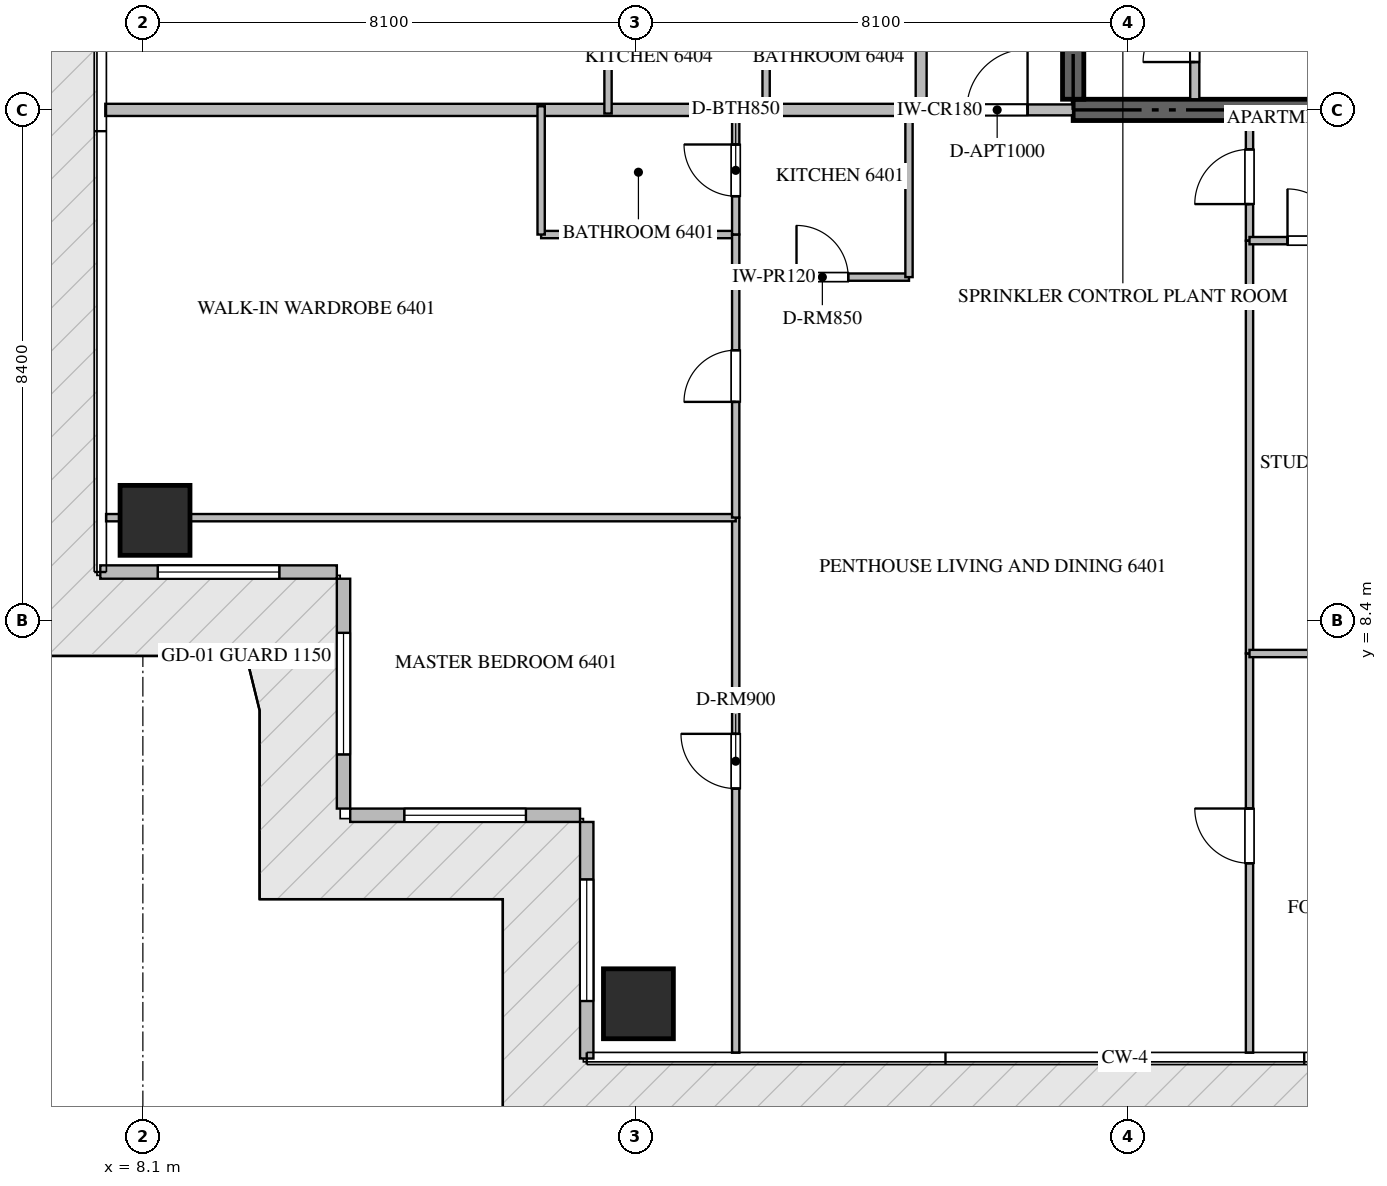
"""IFC4 building model, lengths in metres.
Left out: names, types, materials, properties, quantities, classifications, styles, units other than length and angle.
Written with IfcOpenShell. Run it as: python <this file> out.ifc"""

import sys

from ifc_helpers import new_model, si_unit, direction, frame, frame_2d, origin, origin_2d, place, context, subcontext, project, spatial, rectangle, extrude, source, transform, mapped, element, fill, save


model = new_model("IFC4")
c1 = context("Model", 3, precision=1e-05, world=origin(), true_north=direction((0.0, 1.0)))
c2 = subcontext(c1, "Body", "Model", "MODEL_VIEW")
j1 = project(units=[si_unit("LENGTHUNIT", "METRE"), si_unit("PLANEANGLEUNIT", "RADIAN")], contexts=[c1])
p1 = place(None, origin())
s1 = spatial("IfcSite", under=j1, at=p1, CompositionType="ELEMENT")
p2 = place(p1, origin())
s2 = spatial("IfcBuilding", under=s1, at=p2, CompositionType="ELEMENT")
p3 = place(p2, frame((0.0, 0.0, 256.65)))
s3 = spatial("IfcBuildingStorey", under=s2, at=p3, CompositionType="ELEMENT", Elevation=256.65)
p4 = place(p3, frame((23.4, 16.8, -0.26), z_axis=(0.0, 0.0, 1.0), x_axis=(1.0, 0.0, 0.0)))
e1 = element("IfcWall", 1, at=p4, inside=s3, PredefinedType="SHEAR", context=c2, shape_type="SweptSolid", body=[
    extrude(rectangle(XDim=18.0, YDim=0.35, at=frame_2d((9.0, 0.0))), origin(), (0.0, 0.0, 1.0), 3.848),
])
p5 = place(p3, frame((23.4, 16.975, -0.26), z_axis=(0.0, 0.0, 1.0), x_axis=(0.0, 1.0, 0.0)))
e2 = element("IfcWall", 2, at=p5, inside=s3, PredefinedType="SHEAR", context=c2, shape_type="SweptSolid", body=[
    extrude(rectangle(XDim=4.875, YDim=0.35, at=frame_2d((2.438, 0.0))), origin(), (0.0, 0.0, 1.0), 3.848),
])
m1 = source(origin(), c2, "Body", "SweptSolid", [
    extrude(rectangle(XDim=1.15, YDim=1.15, at=origin_2d()), origin(), (0.0, 0.0, 1.0), 3.85),
])
for number, where, z_axis, x_axis in (
    (3, (16.25, 2.1, -0.26), (0.0, 0.0, 1.0), (1.0, 0.0, 0.0)),
    (4, (8.3, 10.05, -0.26), (0.0, 0.0, 1.0), (1.0, 0.0, 0.0)),
):
    element("IfcColumn", number, at=place(p3, frame(where, z_axis=z_axis, x_axis=x_axis)), inside=s3, PredefinedType="COLUMN", context=c2, shape_type="MappedRepresentation", body=[
        mapped(m1, transform((0.0, 0.0, 0.0), scale=1.0)),
    ])
p6 = place(p3, frame((7.4, 9.2, 0.0), z_axis=(0.0, 0.0, 1.0), x_axis=(1.0, 0.0, 0.0)))
e5 = element("IfcWall", 5, at=p6, inside=s3, PredefinedType="ELEMENTEDWALL", context=c2, shape_type="SweptSolid", body=[
    extrude(rectangle(XDim=3.89, YDim=0.22, at=frame_2d((1.945, 0.0))), origin(), (0.0, 0.0, 1.0), 3.575),
])
p7 = place(p6, frame((0.945, 0.0, 0.65)))
e6 = element("IfcOpeningElement", 6, at=p7, cuts=e5, PredefinedType="OPENING", context=c2, shape_type="SweptSolid", body=[
    extrude(rectangle(XDim=2.0, YDim=2.2, at=frame_2d((1.0, 1.1))), frame((0.0, 0.12, 0.0), z_axis=(0.0, -1.0, 0.0), x_axis=(1.0, 0.0, 0.0)), (0.0, 0.0, 1.0), 0.24),
])
p8 = place(p3, frame((11.4, 9.09, 0.0), z_axis=(0.0, 0.0, 1.0), x_axis=(0.0, -1.0, 0.0)))
e7 = element("IfcWall", 7, at=p8, inside=s3, PredefinedType="ELEMENTEDWALL", context=c2, shape_type="SweptSolid", body=[
    extrude(rectangle(XDim=3.78, YDim=0.22, at=frame_2d((1.89, 0.0))), origin(), (0.0, 0.0, 1.0), 3.575),
])
p9 = place(p8, frame((0.89, 0.0, 0.65)))
e8 = element("IfcOpeningElement", 8, at=p9, cuts=e7, PredefinedType="OPENING", context=c2, shape_type="SweptSolid", body=[
    extrude(rectangle(XDim=2.0, YDim=2.2, at=frame_2d((1.0, 1.1))), frame((0.0, 0.12, 0.0), z_axis=(0.0, -1.0, 0.0), x_axis=(1.0, 0.0, 0.0)), (0.0, 0.0, 1.0), 0.24),
])
p10 = place(p3, frame((11.51, 5.2, 0.0), z_axis=(0.0, 0.0, 1.0), x_axis=(1.0, 0.0, 0.0)))
e9 = element("IfcWall", 9, at=p10, inside=s3, PredefinedType="ELEMENTEDWALL", context=c2, shape_type="SweptSolid", body=[
    extrude(rectangle(XDim=3.78, YDim=0.22, at=frame_2d((1.89, 0.0))), origin(), (0.0, 0.0, 1.0), 3.575),
])
p11 = place(p10, frame((0.89, 0.0, 0.65)))
e10 = element("IfcOpeningElement", 10, at=p11, cuts=e9, PredefinedType="OPENING", context=c2, shape_type="SweptSolid", body=[
    extrude(rectangle(XDim=2.0, YDim=2.2, at=frame_2d((1.0, 1.1))), frame((0.0, 0.12, 0.0), z_axis=(0.0, -1.0, 0.0), x_axis=(1.0, 0.0, 0.0)), (0.0, 0.0, 1.0), 0.24),
])
p12 = place(p3, frame((15.4, 5.09, 0.0), z_axis=(0.0, 0.0, 1.0), x_axis=(0.0, -1.0, 0.0)))
e11 = element("IfcWall", 11, at=p12, inside=s3, PredefinedType="ELEMENTEDWALL", context=c2, shape_type="SweptSolid", body=[
    extrude(rectangle(XDim=3.89, YDim=0.22, at=frame_2d((1.945, 0.0))), origin(), (0.0, 0.0, 1.0), 3.575),
])
p13 = place(p12, frame((0.945, 0.0, 0.65)))
e12 = element("IfcOpeningElement", 12, at=p13, cuts=e11, PredefinedType="OPENING", context=c2, shape_type="SweptSolid", body=[
    extrude(rectangle(XDim=2.0, YDim=2.2, at=frame_2d((1.0, 1.1))), frame((0.0, 0.12, 0.0), z_axis=(0.0, -1.0, 0.0), x_axis=(1.0, 0.0, 0.0)), (0.0, 0.0, 1.0), 0.24),
])
p14 = place(p3, frame((25.4, 16.975, 0.0), z_axis=(0.0, 0.0, 1.0), x_axis=(0.0, 1.0, 0.0)))
e13 = element("IfcWall", 13, at=p14, inside=s3, PredefinedType="PARTITIONING", context=c2, shape_type="SweptSolid", body=[
    extrude(rectangle(XDim=2.075, YDim=0.15, at=frame_2d((1.038, 0.0))), origin(), (0.0, 0.0, 1.0), 3.59),
])
p15 = place(p14, frame((0.612, 0.0, 0.0)))
e14 = element("IfcOpeningElement", 14, at=p15, cuts=e13, PredefinedType="OPENING", context=c2, shape_type="SweptSolid", body=[
    extrude(rectangle(XDim=0.85, YDim=2.1, at=frame_2d((0.425, 1.05))), frame((0.0, 0.085, 0.0), z_axis=(0.0, -1.0, 0.0), x_axis=(1.0, 0.0, 0.0)), (0.0, 0.0, 1.0), 0.17),
])
p16 = place(p3, frame((7.482, 16.8, 0.0), z_axis=(0.0, 0.0, 1.0), x_axis=(1.0, 0.0, 0.0)))
e15 = element("IfcWall", 15, at=p16, inside=s3, PredefinedType="PARTITIONING", context=c2, shape_type="SweptSolid", body=[
    extrude(rectangle(XDim=13.418, YDim=0.2, at=frame_2d((6.709, 0.0))), origin(), (0.0, 0.0, 1.0), 3.59),
])
p17 = place(p3, frame((20.902, 16.8, 0.0), z_axis=(0.0, 0.0, 1.0), x_axis=(1.0, 0.0, 0.0)))
e16 = element("IfcWall", 16, at=p17, inside=s3, PredefinedType="PARTITIONING", context=c2, shape_type="SweptSolid", body=[
    extrude(rectangle(XDim=2.496, YDim=0.18, at=frame_2d((1.248, 0.0))), origin(), (0.0, 0.0, 1.0), 3.59),
])
p18 = place(p17, frame((0.748, 0.0, 0.0)))
e17 = element("IfcOpeningElement", 17, at=p18, cuts=e16, PredefinedType="OPENING", context=c2, shape_type="SweptSolid", body=[
    extrude(rectangle(XDim=1.0, YDim=2.15, at=frame_2d((0.5, 1.075))), frame((0.0, 0.1, 0.0), z_axis=(0.0, -1.0, 0.0), x_axis=(1.0, 0.0, 0.0)), (0.0, 0.0, 1.0), 0.2),
])
p19 = place(p3, frame((20.9, 16.8, 0.0), z_axis=(0.0, 0.0, 1.0), x_axis=(0.0, 1.0, 0.0)))
e18 = element("IfcWall", 18, at=p19, inside=s3, PredefinedType="PARTITIONING", context=c2, shape_type="SweptSolid", body=[
    extrude(rectangle(XDim=16.8, YDim=0.18, at=frame_2d((8.4, 0.0))), origin(), (0.0, 0.0, 1.0), 3.59),
])
p20 = place(p19, frame((3.018, 0.0, 0.0)))
e19 = element("IfcOpeningElement", 19, at=p20, cuts=e18, PredefinedType="OPENING", context=c2, shape_type="SweptSolid", body=[
    extrude(rectangle(XDim=1.0, YDim=2.15, at=frame_2d((0.5, 1.075))), frame((0.0, 0.1, 0.0), z_axis=(0.0, -1.0, 0.0), x_axis=(1.0, 0.0, 0.0)), (0.0, 0.0, 1.0), 0.2),
])
p21 = place(p19, frame((9.18, 0.0, 0.0)))
e20 = element("IfcOpeningElement", 20, at=p21, cuts=e18, PredefinedType="OPENING", context=c2, shape_type="SweptSolid", body=[
    extrude(rectangle(XDim=1.0, YDim=2.15, at=frame_2d((0.5, 1.075))), frame((0.0, 0.1, 0.0), z_axis=(0.0, -1.0, 0.0), x_axis=(1.0, 0.0, 0.0)), (0.0, 0.0, 1.0), 0.2),
])
p22 = place(p19, frame((14.5, 0.0, 0.0)))
e21 = element("IfcOpeningElement", 21, at=p22, cuts=e18, PredefinedType="OPENING", context=c2, shape_type="SweptSolid", body=[
    extrude(rectangle(XDim=1.0, YDim=2.15, at=frame_2d((0.5, 1.075))), frame((0.0, 0.1, 0.0), z_axis=(0.0, -1.0, 0.0), x_axis=(1.0, 0.0, 0.0)), (0.0, 0.0, 1.0), 0.2),
])
p23 = place(p3, frame((17.85, 14.05, 0.0), z_axis=(0.0, 0.0, 1.0), x_axis=(1.0, 0.0, 0.0)))
e22 = element("IfcWall", 22, at=p23, inside=s3, PredefinedType="PARTITIONING", context=c2, shape_type="SweptSolid", body=[
    extrude(rectangle(XDim=2.85, YDim=0.12, at=frame_2d((1.425, 0.0))), origin(), (0.0, 0.0, 1.0), 3.59),
])
p24 = place(p23, frame((1.0, 0.0, 0.0)))
e23 = element("IfcOpeningElement", 23, at=p24, cuts=e22, PredefinedType="OPENING", context=c2, shape_type="SweptSolid", body=[
    extrude(rectangle(XDim=0.85, YDim=2.1, at=frame_2d((0.425, 1.05))), frame((0.0, 0.07, 0.0), z_axis=(0.0, -1.0, 0.0), x_axis=(1.0, 0.0, 0.0)), (0.0, 0.0, 1.0), 0.14),
])
p25 = place(p3, frame((20.7, 14.05, 0.0), z_axis=(0.0, 0.0, 1.0), x_axis=(0.0, 1.0, 0.0)))
e24 = element("IfcWall", 24, at=p25, inside=s3, PredefinedType="PARTITIONING", context=c2, shape_type="SweptSolid", body=[
    extrude(rectangle(XDim=2.81, YDim=0.12, at=frame_2d((1.405, 0.0))), origin(), (0.0, 0.0, 1.0), 3.59),
])
p26 = place(p3, frame((17.85, 1.295, 0.0), z_axis=(0.0, 0.0, 1.0), x_axis=(0.0, 1.0, 0.0)))
e25 = element("IfcWall", 25, at=p26, inside=s3, PredefinedType="PARTITIONING", context=c2, shape_type="SweptSolid", body=[
    extrude(rectangle(XDim=8.799, YDim=0.12, at=frame_2d((4.399, 0.0))), origin(), (0.0, 0.0, 1.0), 3.59),
])
p27 = place(p26, frame((4.344, 0.0, 0.0)))
e26 = element("IfcOpeningElement", 26, at=p27, cuts=e25, PredefinedType="OPENING", context=c2, shape_type="SweptSolid", body=[
    extrude(rectangle(XDim=0.9, YDim=2.1, at=frame_2d((0.45, 1.05))), frame((0.0, 0.07, 0.0), z_axis=(0.0, -1.0, 0.0), x_axis=(1.0, 0.0, 0.0)), (0.0, 0.0, 1.0), 0.14),
])
p28 = place(p3, frame((7.495, 10.094, 0.0), z_axis=(0.0, 0.0, 1.0), x_axis=(1.0, 0.0, 0.0)))
e27 = element("IfcWall", 27, at=p28, inside=s3, PredefinedType="PARTITIONING", context=c2, shape_type="SweptSolid", body=[
    extrude(rectangle(XDim=10.355, YDim=0.12, at=frame_2d((5.177, 0.0))), origin(), (0.0, 0.0, 1.0), 3.122),
])
p29 = place(p3, frame((14.65, 14.75, 0.0), z_axis=(0.0, 0.0, 1.0), x_axis=(1.0, 0.0, 0.0)))
e28 = element("IfcWall", 28, at=p29, inside=s3, PredefinedType="PARTITIONING", context=c2, shape_type="SweptSolid", body=[
    extrude(rectangle(XDim=3.2, YDim=0.12, at=frame_2d((1.6, 0.0))), origin(), (0.0, 0.0, 1.0), 3.59),
])
p30 = place(p3, frame((14.65, 14.75, 0.0), z_axis=(0.0, 0.0, 1.0), x_axis=(0.0, 1.0, 0.0)))
e29 = element("IfcWall", 29, at=p30, inside=s3, PredefinedType="PARTITIONING", context=c2, shape_type="SweptSolid", body=[
    extrude(rectangle(XDim=2.11, YDim=0.12, at=frame_2d((1.055, 0.0))), origin(), (0.0, 0.0, 1.0), 3.59),
])
p31 = place(p3, frame((17.85, 10.096, 0.0), z_axis=(0.0, 0.0, 1.0), x_axis=(0.0, 1.0, 0.0)))
e30 = element("IfcWall", 30, at=p31, inside=s3, PredefinedType="PARTITIONING", context=c2, shape_type="SweptSolid", body=[
    extrude(rectangle(XDim=4.654, YDim=0.12, at=frame_2d((2.327, 0.0))), origin(), (0.0, 0.0, 1.0), 3.59),
])
p32 = place(p31, frame((1.902, 0.0, 0.0)))
e31 = element("IfcOpeningElement", 31, at=p32, cuts=e30, PredefinedType="OPENING", context=c2, shape_type="SweptSolid", body=[
    extrude(rectangle(XDim=0.85, YDim=2.1, at=frame_2d((0.425, 1.05))), frame((0.0, 0.07, 0.0), z_axis=(0.0, -1.0, 0.0), x_axis=(1.0, 0.0, 0.0)), (0.0, 0.0, 1.0), 0.14),
])
p33 = place(p3, frame((17.85, 14.752, 0.0), z_axis=(0.0, 0.0, 1.0), x_axis=(0.0, 1.0, 0.0)))
e32 = element("IfcWall", 32, at=p33, inside=s3, PredefinedType="PARTITIONING", context=c2, shape_type="SweptSolid", body=[
    extrude(rectangle(XDim=2.108, YDim=0.12, at=frame_2d((1.054, 0.0))), origin(), (0.0, 0.0, 1.0), 3.59),
])
p34 = place(p33, frame((0.629, 0.0, 0.0)))
e33 = element("IfcOpeningElement", 33, at=p34, cuts=e32, PredefinedType="OPENING", context=c2, shape_type="SweptSolid", body=[
    extrude(rectangle(XDim=0.85, YDim=2.1, at=frame_2d((0.425, 1.05))), frame((0.0, 0.07, 0.0), z_axis=(0.0, -1.0, 0.0), x_axis=(1.0, 0.0, 0.0)), (0.0, 0.0, 1.0), 0.14),
])
p35 = place(p3, frame((26.3, 14.65, 0.0), z_axis=(0.0, 0.0, 1.0), x_axis=(0.0, 1.0, 0.0)))
e34 = element("IfcWall", 34, at=p35, inside=s3, PredefinedType="PARTITIONING", context=c2, shape_type="SweptSolid", body=[
    extrude(rectangle(XDim=1.975, YDim=0.12, at=frame_2d((0.988, 0.0))), origin(), (0.0, 0.0, 1.0), 3.59),
])
p36 = place(p35, frame((0.601, 0.0, 0.0)))
e35 = element("IfcOpeningElement", 35, at=p36, cuts=e34, PredefinedType="OPENING", context=c2, shape_type="SweptSolid", body=[
    extrude(rectangle(XDim=0.9, YDim=2.1, at=frame_2d((0.45, 1.05))), frame((0.0, 0.07, 0.0), z_axis=(0.0, -1.0, 0.0), x_axis=(1.0, 0.0, 0.0)), (0.0, 0.0, 1.0), 0.14),
])
p37 = place(p3, frame((26.3, 1.295, 0.0), z_axis=(0.0, 0.0, 1.0), x_axis=(0.0, 1.0, 0.0)))
e36 = element("IfcWall", 36, at=p37, inside=s3, PredefinedType="PARTITIONING", context=c2, shape_type="SweptSolid", body=[
    extrude(rectangle(XDim=6.565, YDim=0.12, at=frame_2d((3.283, 0.0))), origin(), (0.0, 0.0, 1.0), 3.59),
])
p38 = place(p37, frame((3.116, 0.0, 0.0)))
e37 = element("IfcOpeningElement", 37, at=p38, cuts=e36, PredefinedType="OPENING", context=c2, shape_type="SweptSolid", body=[
    extrude(rectangle(XDim=0.9, YDim=2.1, at=frame_2d((0.45, 1.05))), frame((0.0, 0.07, 0.0), z_axis=(0.0, -1.0, 0.0), x_axis=(1.0, 0.0, 0.0)), (0.0, 0.0, 1.0), 0.14),
])
p39 = place(p3, frame((26.3, 7.862, 0.0), z_axis=(0.0, 0.0, 1.0), x_axis=(0.0, 1.0, 0.0)))
e38 = element("IfcWall", 38, at=p39, inside=s3, PredefinedType="PARTITIONING", context=c2, shape_type="SweptSolid", body=[
    extrude(rectangle(XDim=6.786, YDim=0.12, at=frame_2d((3.393, 0.0))), origin(), (0.0, 0.0, 1.0), 3.59),
])
p40 = place(p3, frame((26.3, 7.86, 0.0), z_axis=(0.0, 0.0, 1.0), x_axis=(1.0, 0.0, 0.0)))
e39 = element("IfcWall", 39, at=p40, inside=s3, PredefinedType="PARTITIONING", context=c2, shape_type="SweptSolid", body=[
    extrude(rectangle(XDim=5.15, YDim=0.12, at=frame_2d((2.575, 0.0))), origin(), (0.0, 0.0, 1.0), 3.59),
])
p41 = place(p3, frame((26.3, 14.65, 0.0), z_axis=(0.0, 0.0, 1.0), x_axis=(1.0, 0.0, 0.0)))
e40 = element("IfcWall", 40, at=p41, inside=s3, PredefinedType="PARTITIONING", context=c2, shape_type="SweptSolid", body=[
    extrude(rectangle(XDim=2.1, YDim=0.12, at=frame_2d((1.05, 0.0))), origin(), (0.0, 0.0, 1.0), 3.59),
])
p42 = place(p41, frame((0.625, 0.0, 0.0)))
e41 = element("IfcOpeningElement", 41, at=p42, cuts=e40, PredefinedType="OPENING", context=c2, shape_type="SweptSolid", body=[
    extrude(rectangle(XDim=0.85, YDim=2.1, at=frame_2d((0.425, 1.05))), frame((0.0, 0.07, 0.0), z_axis=(0.0, -1.0, 0.0), x_axis=(1.0, 0.0, 0.0)), (0.0, 0.0, 1.0), 0.14),
])
for number, where, z_axis, x_axis in (
    (42, (18.35, 16.74, 0.0), (0.0, 0.0, 1.0), (0.0, 1.0, 0.0)),
    (43, (15.75, 16.74, 0.0), (0.0, 0.0, 1.0), (0.0, 1.0, 0.0)),
):
    element("IfcWall", number, at=place(p3, frame(where, z_axis=z_axis, x_axis=x_axis)), inside=s3, PredefinedType="PARTITIONING", context=c2, shape_type="SweptSolid", body=[
        extrude(rectangle(XDim=2.31, YDim=0.12, at=frame_2d((1.155, 0.0))), origin(), (0.0, 0.0, 1.0), 3.59),
    ])
m2 = source(origin(), c2, "Body", "SweptSolid", [
    extrude(rectangle(XDim=2.0, YDim=2.2, at=frame_2d((1.0, 1.1))), frame((0.0, 0.03, 0.0), z_axis=(0.0, -1.0, 0.0), x_axis=(1.0, 0.0, 0.0)), (0.0, 0.0, 1.0), 0.06),
])
p43 = place(p7, origin())
e44 = element("IfcWindow", 44, at=p43, inside=s3, PartitioningType="SINGLE_PANEL", PredefinedType="WINDOW", context=c2, shape_type="MappedRepresentation", body=[
    mapped(m2, transform((0.0, 0.0, 0.0), scale=1.0)),
])
fill(e6, e44)
p44 = place(p9, origin())
e45 = element("IfcWindow", 45, at=p44, inside=s3, PartitioningType="SINGLE_PANEL", PredefinedType="WINDOW", context=c2, shape_type="MappedRepresentation", body=[
    mapped(m2, transform((0.0, 0.0, 0.0), scale=1.0)),
])
fill(e8, e45)
p45 = place(p11, origin())
e46 = element("IfcWindow", 46, at=p45, inside=s3, PartitioningType="SINGLE_PANEL", PredefinedType="WINDOW", context=c2, shape_type="MappedRepresentation", body=[
    mapped(m2, transform((0.0, 0.0, 0.0), scale=1.0)),
])
fill(e10, e46)
p46 = place(p13, origin())
e47 = element("IfcWindow", 47, at=p46, inside=s3, PartitioningType="SINGLE_PANEL", PredefinedType="WINDOW", context=c2, shape_type="MappedRepresentation", body=[
    mapped(m2, transform((0.0, 0.0, 0.0), scale=1.0)),
])
fill(e12, e47)
m3 = source(origin(), c2, "Body", "SweptSolid", [
    extrude(rectangle(XDim=0.85, YDim=2.1, at=frame_2d((0.425, 1.05))), frame((0.0, 0.025, 0.0), z_axis=(0.0, -1.0, 0.0), x_axis=(1.0, 0.0, 0.0)), (0.0, 0.0, 1.0), 0.05),
])
p47 = place(p15, origin())
e48 = element("IfcDoor", 48, at=p47, inside=s3, OperationType="SINGLE_SWING_LEFT", PredefinedType="DOOR", context=c2, shape_type="MappedRepresentation", body=[
    mapped(m3, transform((0.0, 0.0, 0.0), scale=1.0)),
])
fill(e14, e48)
m4 = source(origin(), c2, "Body", "SweptSolid", [
    extrude(rectangle(XDim=1.0, YDim=2.15, at=frame_2d((0.5, 1.075))), frame((0.0, 0.025, 0.0), z_axis=(0.0, -1.0, 0.0), x_axis=(1.0, 0.0, 0.0)), (0.0, 0.0, 1.0), 0.05),
])
p48 = place(p18, origin())
e49 = element("IfcDoor", 49, at=p48, inside=s3, OperationType="SINGLE_SWING_RIGHT", PredefinedType="DOOR", context=c2, shape_type="MappedRepresentation", body=[
    mapped(m4, transform((0.0, 0.0, 0.0), scale=1.0)),
])
fill(e17, e49)
p49 = place(p24, origin())
e50 = element("IfcDoor", 50, at=p49, inside=s3, OperationType="SINGLE_SWING_LEFT", PredefinedType="DOOR", context=c2, shape_type="MappedRepresentation", body=[
    mapped(m3, transform((0.0, 0.0, 0.0), scale=1.0)),
])
fill(e23, e50)
m5 = source(origin(), c2, "Body", "SweptSolid", [
    extrude(rectangle(XDim=0.9, YDim=2.1, at=frame_2d((0.45, 1.05))), frame((0.0, 0.025, 0.0), z_axis=(0.0, -1.0, 0.0), x_axis=(1.0, 0.0, 0.0)), (0.0, 0.0, 1.0), 0.05),
])
p50 = place(p27, origin())
e51 = element("IfcDoor", 51, at=p50, inside=s3, OperationType="SINGLE_SWING_RIGHT", PredefinedType="DOOR", context=c2, shape_type="MappedRepresentation", body=[
    mapped(m5, transform((0.0, 0.0, 0.0), scale=1.0)),
])
fill(e26, e51)
p51 = place(p32, origin())
e52 = element("IfcDoor", 52, at=p51, inside=s3, OperationType="SINGLE_SWING_LEFT", PredefinedType="DOOR", context=c2, shape_type="MappedRepresentation", body=[
    mapped(m3, transform((0.0, 0.0, 0.0), scale=1.0)),
])
fill(e31, e52)
p52 = place(p34, origin())
e53 = element("IfcDoor", 53, at=p52, inside=s3, OperationType="SINGLE_SWING_RIGHT", PredefinedType="DOOR", context=c2, shape_type="MappedRepresentation", body=[
    mapped(m3, transform((0.0, 0.0, 0.0), scale=1.0)),
])
fill(e33, e53)
p53 = place(p36, origin())
e54 = element("IfcDoor", 54, at=p53, inside=s3, OperationType="SINGLE_SWING_LEFT", PredefinedType="DOOR", context=c2, shape_type="MappedRepresentation", body=[
    mapped(m5, transform((0.0, 0.0, 0.0), scale=1.0)),
])
fill(e35, e54)
p54 = place(p38, origin())
e55 = element("IfcDoor", 55, at=p54, inside=s3, OperationType="SINGLE_SWING_RIGHT", PredefinedType="DOOR", context=c2, shape_type="MappedRepresentation", body=[
    mapped(m5, transform((0.0, 0.0, 0.0), scale=1.0)),
])
fill(e37, e55)
p55 = place(p42, origin())
e56 = element("IfcDoor", 56, at=p55, inside=s3, OperationType="SINGLE_SWING_LEFT", PredefinedType="DOOR", context=c2, shape_type="MappedRepresentation", body=[
    mapped(m3, transform((0.0, 0.0, 0.0), scale=1.0)),
])
fill(e41, e56)
save(model, sys.argv[1])
